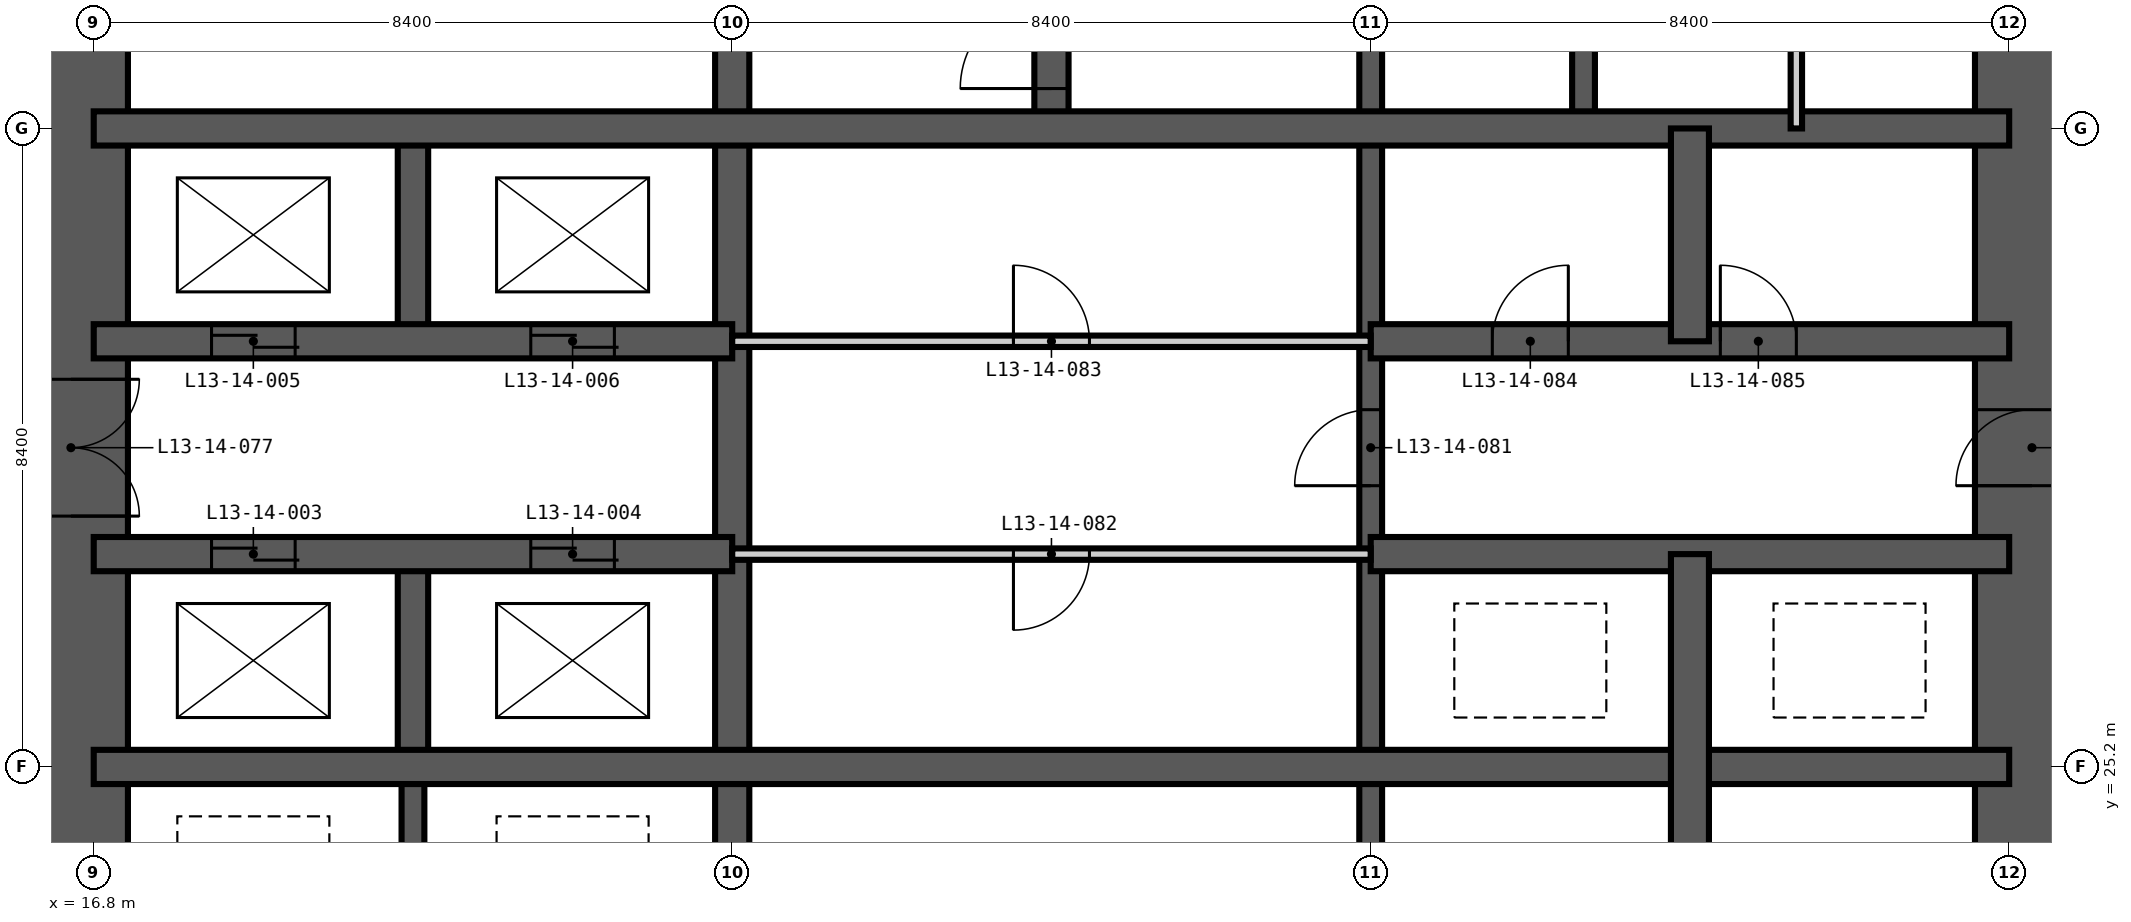
"""IFC4 building model, lengths in metres.
Left out: names, types, materials, properties, quantities, classifications, styles, units other than length and angle.
Written with IfcOpenShell. Run it as: python <this file> out.ifc"""

import sys

from ifc_helpers import new_model, si_unit, direction, frame, frame_2d, origin, place, context, subcontext, project, spatial, rectangle, extrude, element, fill, save


model = new_model("IFC4")
c1 = context("Model", 3, precision=1e-05, world=origin(), true_north=direction((0.0, 1.0)))
c2 = subcontext(c1, "Body", "Model", "MODEL_VIEW")
j1 = project(units=[si_unit("LENGTHUNIT", "METRE"), si_unit("PLANEANGLEUNIT", "RADIAN")], contexts=[c1])
p1 = place(None, origin())
s1 = spatial("IfcSite", under=j1, at=p1, CompositionType="ELEMENT")
p2 = place(p1, origin())
s2 = spatial("IfcBuilding", under=s1, at=p2, CompositionType="ELEMENT")
p3 = place(p2, frame((0.0, 0.0, 55.8)))
s3 = spatial("IfcBuildingStorey", under=s2, at=p3, CompositionType="ELEMENT", Elevation=55.8)
p4 = place(p3, frame((42.3, 17.25, -0.35), z_axis=(0.0, 0.0, 1.0), x_axis=(0.0, 1.0, 0.0)))
e1 = element("IfcWall", 1, at=p4, inside=s3, PredefinedType="SHEAR", context=c2, shape_type="SweptSolid", body=[
    extrude(rectangle(XDim=24.3, YDim=1.5, at=frame_2d((12.15, 0.0))), origin(), (0.0, 0.0, 1.0), 3.6),
])
p5 = place(p4, frame((0.35, 0.0, 0.35)))
e2 = element("IfcOpeningElement", 2, at=p5, cuts=e1, PredefinedType="OPENING", context=c2, shape_type="SweptSolid", body=[
    extrude(rectangle(XDim=1.2, YDim=2.2, at=frame_2d((0.6, 1.1))), frame((0.0, 0.76, 0.0), z_axis=(0.0, -1.0, 0.0), x_axis=(1.0, 0.0, 0.0)), (0.0, 0.0, 1.0), 1.52),
])
p6 = place(p4, frame((11.65, 0.0, 0.35)))
e3 = element("IfcOpeningElement", 3, at=p6, cuts=e1, PredefinedType="OPENING", context=c2, shape_type="SweptSolid", body=[
    extrude(rectangle(XDim=1.0, YDim=2.1, at=frame_2d((0.5, 1.05))), frame((0.0, 0.76, 0.0), z_axis=(0.0, -1.0, 0.0), x_axis=(1.0, 0.0, 0.0)), (0.0, 0.0, 1.0), 1.52),
])
p7 = place(p4, frame((20.05, 0.0, 0.35)))
e4 = element("IfcOpeningElement", 4, at=p7, cuts=e1, PredefinedType="OPENING", context=c2, shape_type="SweptSolid", body=[
    extrude(rectangle(XDim=1.0, YDim=2.1, at=frame_2d((0.5, 1.05))), frame((0.0, 0.76, 0.0), z_axis=(0.0, -1.0, 0.0), x_axis=(1.0, 0.0, 0.0)), (0.0, 0.0, 1.0), 1.52),
])
p8 = place(p3, frame((16.5, 41.55, -0.35), z_axis=(0.0, 0.0, 1.0), x_axis=(0.0, -1.0, 0.0)))
e5 = element("IfcWall", 5, at=p8, inside=s3, PredefinedType="SHEAR", context=c2, shape_type="SweptSolid", body=[
    extrude(rectangle(XDim=24.3, YDim=1.5, at=frame_2d((12.15, 0.0))), origin(), (0.0, 0.0, 1.0), 3.6),
])
p9 = place(p8, frame((11.25, 0.0, 0.35)))
e6 = element("IfcOpeningElement", 6, at=p9, cuts=e5, PredefinedType="OPENING", context=c2, shape_type="SweptSolid", body=[
    extrude(rectangle(XDim=1.8, YDim=2.2, at=frame_2d((0.9, 1.1))), frame((0.0, 0.76, 0.0), z_axis=(0.0, -1.0, 0.0), x_axis=(1.0, 0.0, 0.0)), (0.0, 0.0, 1.0), 1.52),
])
p10 = place(p8, frame((20.05, 0.0, 0.35)))
e7 = element("IfcOpeningElement", 7, at=p10, cuts=e5, PredefinedType="OPENING", context=c2, shape_type="SweptSolid", body=[
    extrude(rectangle(XDim=1.0, YDim=2.1, at=frame_2d((0.5, 1.05))), frame((0.0, 0.76, 0.0), z_axis=(0.0, -1.0, 0.0), x_axis=(1.0, 0.0, 0.0)), (0.0, 0.0, 1.0), 1.52),
])
p11 = place(p8, frame((5.35, 0.0, 0.35)))
e8 = element("IfcOpeningElement", 8, at=p11, cuts=e5, PredefinedType="OPENING", context=c2, shape_type="SweptSolid", body=[
    extrude(rectangle(XDim=1.0, YDim=2.1, at=frame_2d((0.5, 1.05))), frame((0.0, 0.76, 0.0), z_axis=(0.0, -1.0, 0.0), x_axis=(1.0, 0.0, 0.0)), (0.0, 0.0, 1.0), 1.52),
])
p12 = place(p3, frame((21.0, 22.4, -0.35), z_axis=(0.0, 0.0, 1.0), x_axis=(0.0, 1.0, 0.0)))
e9 = element("IfcWall", 9, at=p12, inside=s3, PredefinedType="SHEAR", context=c2, shape_type="SweptSolid", body=[
    extrude(rectangle(XDim=2.8, YDim=0.3, at=frame_2d((1.4, 0.0))), origin(), (0.0, 0.0, 1.0), 3.6),
])
p13 = place(p3, frame((33.6, 16.8, -0.35), z_axis=(0.0, 0.0, 1.0), x_axis=(0.0, 1.0, 0.0)))
e10 = element("IfcWall", 10, at=p13, inside=s3, PredefinedType="SHEAR", context=c2, shape_type="SweptSolid", body=[
    extrude(rectangle(XDim=25.2, YDim=0.3, at=frame_2d((12.6, 0.0))), origin(), (0.0, 0.0, 1.0), 3.6),
])
p14 = place(p13, frame((22.5, 0.0, 0.35)))
e11 = element("IfcOpeningElement", 11, at=p14, cuts=e10, PredefinedType="OPENING", context=c2, shape_type="SweptSolid", body=[
    extrude(rectangle(XDim=1.2, YDim=2.2, at=frame_2d((0.6, 1.1))), frame((0.0, 0.16, 0.0), z_axis=(0.0, -1.0, 0.0), x_axis=(1.0, 0.0, 0.0)), (0.0, 0.0, 1.0), 0.32),
])
p15 = place(p13, frame((18.3, 0.0, 0.35)))
e12 = element("IfcOpeningElement", 12, at=p15, cuts=e10, PredefinedType="OPENING", context=c2, shape_type="SweptSolid", body=[
    extrude(rectangle(XDim=1.2, YDim=2.2, at=frame_2d((0.6, 1.1))), frame((0.0, 0.16, 0.0), z_axis=(0.0, -1.0, 0.0), x_axis=(1.0, 0.0, 0.0)), (0.0, 0.0, 1.0), 0.32),
])
p16 = place(p13, frame((12.1, 0.0, 0.35)))
e13 = element("IfcOpeningElement", 13, at=p16, cuts=e10, PredefinedType="OPENING", context=c2, shape_type="SweptSolid", body=[
    extrude(rectangle(XDim=1.0, YDim=2.1, at=frame_2d((0.5, 1.05))), frame((0.0, 0.16, 0.0), z_axis=(0.0, -1.0, 0.0), x_axis=(1.0, 0.0, 0.0)), (0.0, 0.0, 1.0), 0.32),
])
p17 = place(p3, frame((36.4, 33.6, -0.35), z_axis=(0.0, 0.0, 1.0), x_axis=(0.0, 1.0, 0.0)))
e14 = element("IfcWall", 14, at=p17, inside=s3, PredefinedType="SHEAR", context=c2, shape_type="SweptSolid", body=[
    extrude(rectangle(XDim=8.4, YDim=0.3, at=frame_2d((4.2, 0.0))), origin(), (0.0, 0.0, 1.0), 3.6),
])
for number, where, z_axis, x_axis in (
    (15, (21.0, 25.2, -0.35), (0.0, 0.0, 1.0), (0.0, 1.0, 0.0)),
    (16, (21.0, 30.8, -0.35), (0.0, 0.0, 1.0), (0.0, 1.0, 0.0)),
):
    element("IfcWall", number, at=place(p3, frame(where, z_axis=z_axis, x_axis=x_axis)), inside=s3, PredefinedType="SHEAR", context=c2, shape_type="SweptSolid", body=[
        extrude(rectangle(XDim=2.8, YDim=0.4, at=frame_2d((1.4, 0.0))), origin(), (0.0, 0.0, 1.0), 3.6),
    ])
p18 = place(p3, frame((25.2, 16.8, -0.35), z_axis=(0.0, 0.0, 1.0), x_axis=(0.0, 1.0, 0.0)))
e17 = element("IfcWall", 17, at=p18, inside=s3, PredefinedType="SHEAR", context=c2, shape_type="SweptSolid", body=[
    extrude(rectangle(XDim=25.2, YDim=0.45, at=frame_2d((12.6, 0.0))), origin(), (0.0, 0.0, 1.0), 3.6),
])
p19 = place(p3, frame((29.4, 33.6, -0.35), z_axis=(0.0, 0.0, 1.0), x_axis=(0.0, 1.0, 0.0)))
e18 = element("IfcWall", 18, at=p19, inside=s3, PredefinedType="SHEAR", context=c2, shape_type="SweptSolid", body=[
    extrude(rectangle(XDim=8.4, YDim=0.45, at=frame_2d((4.2, 0.0))), origin(), (0.0, 0.0, 1.0), 3.6),
])
p20 = place(p19, frame((0.525, 0.0, 0.35)))
e19 = element("IfcOpeningElement", 19, at=p20, cuts=e18, PredefinedType="OPENING", context=c2, shape_type="SweptSolid", body=[
    extrude(rectangle(XDim=1.2, YDim=2.2, at=frame_2d((0.6, 1.1))), frame((0.0, 0.235, 0.0), z_axis=(0.0, -1.0, 0.0), x_axis=(1.0, 0.0, 0.0)), (0.0, 0.0, 1.0), 0.47),
])
p21 = place(p3, frame((16.8, 25.2, -0.35), z_axis=(0.0, 0.0, 1.0), x_axis=(1.0, 0.0, 0.0)))
e20 = element("IfcWall", 20, at=p21, inside=s3, PredefinedType="SHEAR", context=c2, shape_type="SweptSolid", body=[
    extrude(rectangle(XDim=25.2, YDim=0.45, at=frame_2d((12.6, 0.0))), origin(), (0.0, 0.0, 1.0), 3.6),
])
p22 = place(p3, frame((16.8, 28.0, -0.35), z_axis=(0.0, 0.0, 1.0), x_axis=(1.0, 0.0, 0.0)))
e21 = element("IfcWall", 21, at=p22, inside=s3, PredefinedType="SHEAR", context=c2, shape_type="SweptSolid", body=[
    extrude(rectangle(XDim=8.4, YDim=0.45, at=frame_2d((4.2, 0.0))), origin(), (0.0, 0.0, 1.0), 3.6),
])
p23 = place(p22, frame((1.55, 0.0, 0.35)))
e22 = element("IfcOpeningElement", 22, at=p23, cuts=e21, PredefinedType="OPENING", context=c2, shape_type="SweptSolid", body=[
    extrude(rectangle(XDim=1.1, YDim=2.2, at=frame_2d((0.55, 1.1))), frame((0.0, 0.235, 0.0), z_axis=(0.0, -1.0, 0.0), x_axis=(1.0, 0.0, 0.0)), (0.0, 0.0, 1.0), 0.47),
])
p24 = place(p22, frame((5.75, 0.0, 0.35)))
e23 = element("IfcOpeningElement", 23, at=p24, cuts=e21, PredefinedType="OPENING", context=c2, shape_type="SweptSolid", body=[
    extrude(rectangle(XDim=1.1, YDim=2.2, at=frame_2d((0.55, 1.1))), frame((0.0, 0.235, 0.0), z_axis=(0.0, -1.0, 0.0), x_axis=(1.0, 0.0, 0.0)), (0.0, 0.0, 1.0), 0.47),
])
p25 = place(p3, frame((33.6, 28.0, -0.35), z_axis=(0.0, 0.0, 1.0), x_axis=(1.0, 0.0, 0.0)))
e24 = element("IfcWall", 24, at=p25, inside=s3, PredefinedType="SHEAR", context=c2, shape_type="SweptSolid", body=[
    extrude(rectangle(XDim=8.4, YDim=0.45, at=frame_2d((4.2, 0.0))), origin(), (0.0, 0.0, 1.0), 3.6),
])
p26 = place(p3, frame((16.8, 30.8, -0.35), z_axis=(0.0, 0.0, 1.0), x_axis=(1.0, 0.0, 0.0)))
e25 = element("IfcWall", 25, at=p26, inside=s3, PredefinedType="SHEAR", context=c2, shape_type="SweptSolid", body=[
    extrude(rectangle(XDim=8.4, YDim=0.45, at=frame_2d((4.2, 0.0))), origin(), (0.0, 0.0, 1.0), 3.6),
])
p27 = place(p26, frame((1.55, 0.0, 0.35)))
e26 = element("IfcOpeningElement", 26, at=p27, cuts=e25, PredefinedType="OPENING", context=c2, shape_type="SweptSolid", body=[
    extrude(rectangle(XDim=1.1, YDim=2.2, at=frame_2d((0.55, 1.1))), frame((0.0, 0.235, 0.0), z_axis=(0.0, -1.0, 0.0), x_axis=(1.0, 0.0, 0.0)), (0.0, 0.0, 1.0), 0.47),
])
p28 = place(p26, frame((5.75, 0.0, 0.35)))
e27 = element("IfcOpeningElement", 27, at=p28, cuts=e25, PredefinedType="OPENING", context=c2, shape_type="SweptSolid", body=[
    extrude(rectangle(XDim=1.1, YDim=2.2, at=frame_2d((0.55, 1.1))), frame((0.0, 0.235, 0.0), z_axis=(0.0, -1.0, 0.0), x_axis=(1.0, 0.0, 0.0)), (0.0, 0.0, 1.0), 0.47),
])
p29 = place(p3, frame((33.6, 30.8, -0.35), z_axis=(0.0, 0.0, 1.0), x_axis=(1.0, 0.0, 0.0)))
e28 = element("IfcWall", 28, at=p29, inside=s3, PredefinedType="SHEAR", context=c2, shape_type="SweptSolid", body=[
    extrude(rectangle(XDim=8.4, YDim=0.45, at=frame_2d((4.2, 0.0))), origin(), (0.0, 0.0, 1.0), 3.6),
])
p30 = place(p29, frame((1.6, 0.0, 0.35)))
e29 = element("IfcOpeningElement", 29, at=p30, cuts=e28, PredefinedType="OPENING", context=c2, shape_type="SweptSolid", body=[
    extrude(rectangle(XDim=1.0, YDim=2.1, at=frame_2d((0.5, 1.05))), frame((0.0, 0.235, 0.0), z_axis=(0.0, -1.0, 0.0), x_axis=(1.0, 0.0, 0.0)), (0.0, 0.0, 1.0), 0.47),
])
p31 = place(p29, frame((4.6, 0.0, 0.35)))
e30 = element("IfcOpeningElement", 30, at=p31, cuts=e28, PredefinedType="OPENING", context=c2, shape_type="SweptSolid", body=[
    extrude(rectangle(XDim=1.0, YDim=2.1, at=frame_2d((0.5, 1.05))), frame((0.0, 0.235, 0.0), z_axis=(0.0, -1.0, 0.0), x_axis=(1.0, 0.0, 0.0)), (0.0, 0.0, 1.0), 0.47),
])
p32 = place(p3, frame((16.8, 33.6, -0.35), z_axis=(0.0, 0.0, 1.0), x_axis=(1.0, 0.0, 0.0)))
e31 = element("IfcWall", 31, at=p32, inside=s3, PredefinedType="SHEAR", context=c2, shape_type="SweptSolid", body=[
    extrude(rectangle(XDim=25.2, YDim=0.45, at=frame_2d((12.6, 0.0))), origin(), (0.0, 0.0, 1.0), 3.6),
])
p33 = place(p3, frame((37.8, 16.8, -0.35), z_axis=(0.0, 0.0, 1.0), x_axis=(0.0, 1.0, 0.0)))
e32 = element("IfcWall", 32, at=p33, inside=s3, PredefinedType="SHEAR", context=c2, shape_type="SweptSolid", body=[
    extrude(rectangle(XDim=11.2, YDim=0.5, at=frame_2d((5.6, 0.0))), origin(), (0.0, 0.0, 1.0), 3.6),
])
p34 = place(p3, frame((37.8, 30.8, -0.35), z_axis=(0.0, 0.0, 1.0), x_axis=(0.0, 1.0, 0.0)))
e33 = element("IfcWall", 33, at=p34, inside=s3, PredefinedType="SHEAR", context=c2, shape_type="SweptSolid", body=[
    extrude(rectangle(XDim=2.8, YDim=0.5, at=frame_2d((1.4, 0.0))), origin(), (0.0, 0.0, 1.0), 3.6),
])
p35 = place(p3, frame((39.2, 33.6, 0.0), z_axis=(0.0, 0.0, 1.0), x_axis=(0.0, 1.0, 0.0)))
e34 = element("IfcWall", 34, at=p35, inside=s3, PredefinedType="PARTITIONING", context=c2, shape_type="SweptSolid", body=[
    extrude(rectangle(XDim=8.4, YDim=0.15, at=frame_2d((4.2, 0.0))), origin(), (0.0, 0.0, 1.0), 3.25),
])
p36 = place(p35, frame((3.7, 0.0, 0.0)))
e35 = element("IfcOpeningElement", 35, at=p36, cuts=e34, PredefinedType="OPENING", context=c2, shape_type="SweptSolid", body=[
    extrude(rectangle(XDim=1.0, YDim=2.1, at=frame_2d((0.5, 1.05))), frame((0.0, 0.085, 0.0), z_axis=(0.0, -1.0, 0.0), x_axis=(1.0, 0.0, 0.0)), (0.0, 0.0, 1.0), 0.17),
])
p37 = place(p3, frame((25.2, 28.0, 0.0), z_axis=(0.0, 0.0, 1.0), x_axis=(1.0, 0.0, 0.0)))
e36 = element("IfcWall", 36, at=p37, inside=s3, PredefinedType="PARTITIONING", context=c2, shape_type="SweptSolid", body=[
    extrude(rectangle(XDim=8.4, YDim=0.15, at=frame_2d((4.2, 0.0))), origin(), (0.0, 0.0, 1.0), 3.25),
])
p38 = place(p37, frame((3.7, 0.0, 0.0)))
e37 = element("IfcOpeningElement", 37, at=p38, cuts=e36, PredefinedType="OPENING", context=c2, shape_type="SweptSolid", body=[
    extrude(rectangle(XDim=1.0, YDim=2.1, at=frame_2d((0.5, 1.05))), frame((0.0, 0.085, 0.0), z_axis=(0.0, -1.0, 0.0), x_axis=(1.0, 0.0, 0.0)), (0.0, 0.0, 1.0), 0.17),
])
p39 = place(p3, frame((25.2, 30.8, 0.0), z_axis=(0.0, 0.0, 1.0), x_axis=(1.0, 0.0, 0.0)))
e38 = element("IfcWall", 38, at=p39, inside=s3, PredefinedType="PARTITIONING", context=c2, shape_type="SweptSolid", body=[
    extrude(rectangle(XDim=8.4, YDim=0.15, at=frame_2d((4.2, 0.0))), origin(), (0.0, 0.0, 1.0), 3.25),
])
p40 = place(p39, frame((3.7, 0.0, 0.0)))
e39 = element("IfcOpeningElement", 39, at=p40, cuts=e38, PredefinedType="OPENING", context=c2, shape_type="SweptSolid", body=[
    extrude(rectangle(XDim=1.0, YDim=2.1, at=frame_2d((0.5, 1.05))), frame((0.0, 0.085, 0.0), z_axis=(0.0, -1.0, 0.0), x_axis=(1.0, 0.0, 0.0)), (0.0, 0.0, 1.0), 0.17),
])
p41 = place(p20, origin())
e40 = element("IfcDoor", 40, at=p41, inside=s3, OperationType="SINGLE_SWING_LEFT", PredefinedType="DOOR", context=c2, shape_type="SweptSolid", body=[
    extrude(rectangle(XDim=1.2, YDim=2.2, at=frame_2d((0.6, 1.1))), frame((0.0, 0.025, 0.0), z_axis=(0.0, -1.0, 0.0), x_axis=(1.0, 0.0, 0.0)), (0.0, 0.0, 1.0), 0.05),
])
fill(e19, e40)
p42 = place(p23, origin())
e41 = element("IfcDoor", 41, at=p42, inside=s3, OperationType="DOUBLE_DOOR_SLIDING", PredefinedType="DOOR", context=c2, shape_type="SweptSolid", body=[
    extrude(rectangle(XDim=1.1, YDim=2.2, at=frame_2d((0.55, 1.1))), frame((0.0, 0.025, 0.0), z_axis=(0.0, -1.0, 0.0), x_axis=(1.0, 0.0, 0.0)), (0.0, 0.0, 1.0), 0.05),
])
fill(e22, e41)
p43 = place(p24, origin())
e42 = element("IfcDoor", 42, at=p43, inside=s3, OperationType="DOUBLE_DOOR_SLIDING", PredefinedType="DOOR", context=c2, shape_type="SweptSolid", body=[
    extrude(rectangle(XDim=1.1, YDim=2.2, at=frame_2d((0.55, 1.1))), frame((0.0, 0.025, 0.0), z_axis=(0.0, -1.0, 0.0), x_axis=(1.0, 0.0, 0.0)), (0.0, 0.0, 1.0), 0.05),
])
fill(e23, e42)
p44 = place(p27, origin())
e43 = element("IfcDoor", 43, at=p44, inside=s3, OperationType="DOUBLE_DOOR_SLIDING", PredefinedType="DOOR", context=c2, shape_type="SweptSolid", body=[
    extrude(rectangle(XDim=1.1, YDim=2.2, at=frame_2d((0.55, 1.1))), frame((0.0, 0.025, 0.0), z_axis=(0.0, -1.0, 0.0), x_axis=(1.0, 0.0, 0.0)), (0.0, 0.0, 1.0), 0.05),
])
fill(e26, e43)
p45 = place(p28, origin())
e44 = element("IfcDoor", 44, at=p45, inside=s3, OperationType="DOUBLE_DOOR_SLIDING", PredefinedType="DOOR", context=c2, shape_type="SweptSolid", body=[
    extrude(rectangle(XDim=1.1, YDim=2.2, at=frame_2d((0.55, 1.1))), frame((0.0, 0.025, 0.0), z_axis=(0.0, -1.0, 0.0), x_axis=(1.0, 0.0, 0.0)), (0.0, 0.0, 1.0), 0.05),
])
fill(e27, e44)
p46 = place(p9, origin())
e45 = element("IfcDoor", 45, at=p46, inside=s3, OperationType="DOUBLE_DOOR_DOUBLE_SWING", PredefinedType="DOOR", context=c2, shape_type="SweptSolid", body=[
    extrude(rectangle(XDim=1.8, YDim=2.2, at=frame_2d((0.9, 1.1))), frame((0.0, 0.025, 0.0), z_axis=(0.0, -1.0, 0.0), x_axis=(1.0, 0.0, 0.0)), (0.0, 0.0, 1.0), 0.05),
])
fill(e6, e45)
p47 = place(p16, origin())
e46 = element("IfcDoor", 46, at=p47, inside=s3, OperationType="SINGLE_SWING_LEFT", PredefinedType="DOOR", context=c2, shape_type="SweptSolid", body=[
    extrude(rectangle(XDim=1.0, YDim=2.1, at=frame_2d((0.5, 1.05))), frame((0.0, 0.025, 0.0), z_axis=(0.0, -1.0, 0.0), x_axis=(1.0, 0.0, 0.0)), (0.0, 0.0, 1.0), 0.05),
])
fill(e13, e46)
p48 = place(p38, frame((1.0, 0.0, 0.0), z_axis=(0.0, 0.0, 1.0), x_axis=(-1.0, 0.0, 0.0)))
e47 = element("IfcDoor", 47, at=p48, inside=s3, OperationType="SINGLE_SWING_RIGHT", PredefinedType="DOOR", context=c2, shape_type="SweptSolid", body=[
    extrude(rectangle(XDim=1.0, YDim=2.1, at=frame_2d((0.5, 1.05))), frame((0.0, 0.025, 0.0), z_axis=(0.0, -1.0, 0.0), x_axis=(1.0, 0.0, 0.0)), (0.0, 0.0, 1.0), 0.05),
])
fill(e37, e47)
p49 = place(p40, origin())
e48 = element("IfcDoor", 48, at=p49, inside=s3, OperationType="SINGLE_SWING_LEFT", PredefinedType="DOOR", context=c2, shape_type="SweptSolid", body=[
    extrude(rectangle(XDim=1.0, YDim=2.1, at=frame_2d((0.5, 1.05))), frame((0.0, 0.025, 0.0), z_axis=(0.0, -1.0, 0.0), x_axis=(1.0, 0.0, 0.0)), (0.0, 0.0, 1.0), 0.05),
])
fill(e39, e48)
p50 = place(p30, origin())
e49 = element("IfcDoor", 49, at=p50, inside=s3, OperationType="SINGLE_SWING_RIGHT", PredefinedType="DOOR", context=c2, shape_type="SweptSolid", body=[
    extrude(rectangle(XDim=1.0, YDim=2.1, at=frame_2d((0.5, 1.05))), frame((0.0, 0.025, 0.0), z_axis=(0.0, -1.0, 0.0), x_axis=(1.0, 0.0, 0.0)), (0.0, 0.0, 1.0), 0.05),
])
fill(e29, e49)
p51 = place(p31, origin())
e50 = element("IfcDoor", 50, at=p51, inside=s3, OperationType="SINGLE_SWING_LEFT", PredefinedType="DOOR", context=c2, shape_type="SweptSolid", body=[
    extrude(rectangle(XDim=1.0, YDim=2.1, at=frame_2d((0.5, 1.05))), frame((0.0, 0.025, 0.0), z_axis=(0.0, -1.0, 0.0), x_axis=(1.0, 0.0, 0.0)), (0.0, 0.0, 1.0), 0.05),
])
fill(e30, e50)
p52 = place(p6, origin())
e51 = element("IfcDoor", 51, at=p52, inside=s3, OperationType="SINGLE_SWING_LEFT", PredefinedType="DOOR", context=c2, shape_type="SweptSolid", body=[
    extrude(rectangle(XDim=1.0, YDim=2.1, at=frame_2d((0.5, 1.05))), frame((0.0, 0.025, 0.0), z_axis=(0.0, -1.0, 0.0), x_axis=(1.0, 0.0, 0.0)), (0.0, 0.0, 1.0), 0.05),
])
fill(e3, e51)
save(model, sys.argv[1])
